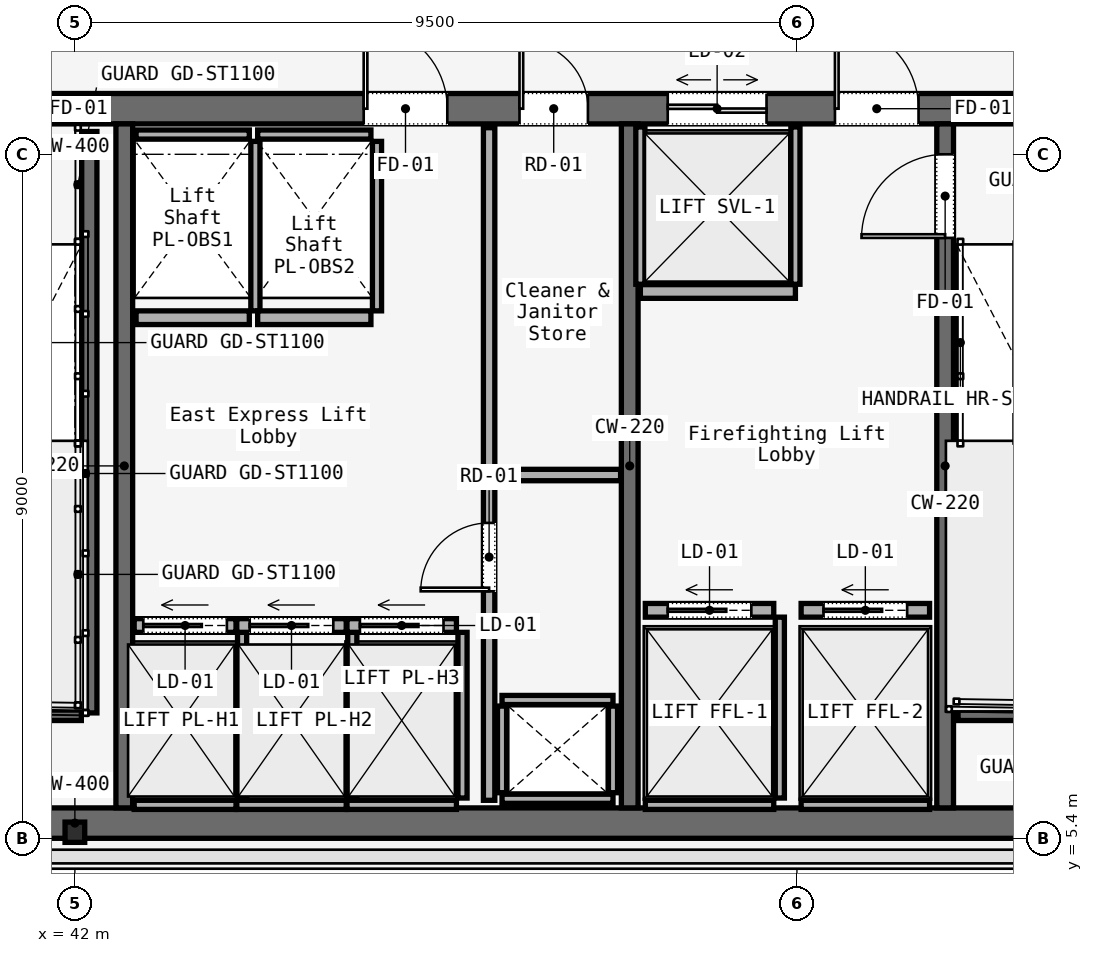
"""IFC4 building model, lengths in metres.
Left out: names, types, materials, properties, quantities, classifications, styles, units other than length and angle.
Written with IfcOpenShell. Run it as: python <this file> out.ifc"""

import sys

from ifc_helpers import new_model, si_unit, direction, frame, frame_2d, origin, origin_2d, place, context, subcontext, project, spatial, rectangle, i_section, extrude, element, fill, save


model = new_model("IFC4")
c1 = context("Model", 3, precision=1e-05, world=origin(), true_north=direction((0.0, 1.0)))
c2 = subcontext(c1, "Body", "Model", "MODEL_VIEW")
j1 = project(units=[si_unit("LENGTHUNIT", "METRE"), si_unit("PLANEANGLEUNIT", "RADIAN")], contexts=[c1])
p1 = place(None, origin())
s1 = spatial("IfcSite", under=j1, at=p1, CompositionType="ELEMENT")
p2 = place(p1, origin())
s2 = spatial("IfcBuilding", under=s1, at=p2, CompositionType="ELEMENT")
p3 = place(p2, frame((0.0, 0.0, 287.1)))
s3 = spatial("IfcBuildingStorey", under=s2, at=p3, CompositionType="ELEMENT", Elevation=287.1)
p4 = place(p3, frame((26.45, 15.0, 0.0), z_axis=(0.0, 0.0, 1.0), x_axis=(1.0, 0.0, 0.0)))
e1 = element("IfcWall", 1, at=p4, inside=s3, PredefinedType="SOLIDWALL", context=c2, shape_type="SweptSolid", body=[
    extrude(rectangle(XDim=31.1, YDim=0.4, at=frame_2d((15.55, 0.0))), origin(), (0.0, 0.0, 1.0), 3.58),
])
p5 = place(p4, frame((1.65, 0.0, 0.0)))
e2 = element("IfcOpeningElement", 2, at=p5, cuts=e1, PredefinedType="OPENING", context=c2, shape_type="SweptSolid", body=[
    extrude(rectangle(XDim=1.1, YDim=2.2, at=frame_2d((0.55, 1.1))), frame((0.0, 0.2, 0.0), z_axis=(0.0, -1.0, 0.0), x_axis=(1.0, 0.0, 0.0)), (0.0, 0.0, 1.0), 0.4),
])
p6 = place(p4, frame((13.65, 0.0, 0.0)))
e3 = element("IfcOpeningElement", 3, at=p6, cuts=e1, PredefinedType="OPENING", context=c2, shape_type="SweptSolid", body=[
    extrude(rectangle(XDim=1.1, YDim=2.2, at=frame_2d((0.55, 1.1))), frame((0.0, 0.2, 0.0), z_axis=(0.0, -1.0, 0.0), x_axis=(1.0, 0.0, 0.0)), (0.0, 0.0, 1.0), 0.4),
])
p7 = place(p4, frame((25.55, 0.0, 0.0)))
e4 = element("IfcOpeningElement", 4, at=p7, cuts=e1, PredefinedType="OPENING", context=c2, shape_type="SweptSolid", body=[
    extrude(rectangle(XDim=1.1, YDim=2.2, at=frame_2d((0.55, 1.1))), frame((0.0, 0.2, 0.0), z_axis=(0.0, -1.0, 0.0), x_axis=(1.0, 0.0, 0.0)), (0.0, 0.0, 1.0), 0.4),
])
p8 = place(p4, frame((19.35, 0.0, 0.0)))
e5 = element("IfcOpeningElement", 5, at=p8, cuts=e1, PredefinedType="OPENING", context=c2, shape_type="SweptSolid", body=[
    extrude(rectangle(XDim=1.1, YDim=2.2, at=frame_2d((0.55, 1.1))), frame((0.0, 0.2, 0.0), z_axis=(0.0, -1.0, 0.0), x_axis=(1.0, 0.0, 0.0)), (0.0, 0.0, 1.0), 0.4),
])
p9 = place(p4, frame((21.4, 0.0, 0.0)))
e6 = element("IfcOpeningElement", 6, at=p9, cuts=e1, PredefinedType="OPENING", context=c2, shape_type="SweptSolid", body=[
    extrude(rectangle(XDim=0.9, YDim=2.1, at=frame_2d((0.45, 1.05))), frame((0.0, 0.2, 0.0), z_axis=(0.0, -1.0, 0.0), x_axis=(1.0, 0.0, 0.0)), (0.0, 0.0, 1.0), 0.4),
])
p10 = place(p4, frame((6.04, 0.0, 0.0)))
e7 = element("IfcOpeningElement", 7, at=p10, cuts=e1, PredefinedType="OPENING", context=c2, shape_type="SweptSolid", body=[
    extrude(rectangle(XDim=0.95, YDim=2.2, at=frame_2d((0.475, 1.1))), frame((0.0, 0.2, 0.0), z_axis=(0.0, -1.0, 0.0), x_axis=(1.0, 0.0, 0.0)), (0.0, 0.0, 1.0), 0.4),
])
p11 = place(p4, frame((9.99, 0.0, 0.0)))
e8 = element("IfcOpeningElement", 8, at=p11, cuts=e1, PredefinedType="OPENING", context=c2, shape_type="SweptSolid", body=[
    extrude(rectangle(XDim=0.95, YDim=2.2, at=frame_2d((0.475, 1.1))), frame((0.0, 0.2, 0.0), z_axis=(0.0, -1.0, 0.0), x_axis=(1.0, 0.0, 0.0)), (0.0, 0.0, 1.0), 0.4),
])
p12 = place(p4, frame((23.35, 0.0, 0.0)))
e9 = element("IfcOpeningElement", 9, at=p12, cuts=e1, PredefinedType="OPENING", context=c2, shape_type="SweptSolid", body=[
    extrude(rectangle(XDim=1.3, YDim=2.3, at=frame_2d((0.65, 1.15))), frame((0.0, 0.2, 0.0), z_axis=(0.0, -1.0, 0.0), x_axis=(1.0, 0.0, 0.0)), (0.0, 0.0, 1.0), 0.4),
])
p13 = place(p3, frame((26.45, 5.6, 0.0), z_axis=(0.0, 0.0, 1.0), x_axis=(1.0, 0.0, 0.0)))
e10 = element("IfcWall", 10, at=p13, inside=s3, PredefinedType="SOLIDWALL", context=c2, shape_type="SweptSolid", body=[
    extrude(rectangle(XDim=31.1, YDim=0.4, at=frame_2d((15.55, 0.0))), origin(), (0.0, 0.0, 1.0), 3.58),
])
for number, where, z_axis, x_axis in (
    (11, (42.65, 5.8, 0.0), (0.0, 0.0, 1.0), (0.0, 1.0, 0.0)),
    (12, (49.3, 5.8, 0.0), (0.0, 0.0, 1.0), (0.0, 1.0, 0.0)),
):
    element("IfcWall", number, at=place(p3, frame(where, z_axis=z_axis, x_axis=x_axis)), inside=s3, PredefinedType="SOLIDWALL", context=c2, shape_type="SweptSolid", body=[
        extrude(rectangle(XDim=9.0, YDim=0.22, at=frame_2d((4.5, 0.0))), origin(), (0.0, 0.0, 1.0), 3.58),
    ])
p14 = place(p3, frame((53.45, 5.8, 0.0), z_axis=(0.0, 0.0, 1.0), x_axis=(0.0, 1.0, 0.0)))
e13 = element("IfcWall", 13, at=p14, inside=s3, PredefinedType="SOLIDWALL", context=c2, shape_type="SweptSolid", body=[
    extrude(rectangle(XDim=9.0, YDim=0.22, at=frame_2d((4.5, 0.0))), origin(), (0.0, 0.0, 1.0), 3.58),
])
p15 = place(p14, frame((7.5, 0.0, 0.0)))
e14 = element("IfcOpeningElement", 14, at=p15, cuts=e13, PredefinedType="OPENING", context=c2, shape_type="SweptSolid", body=[
    extrude(rectangle(XDim=1.1, YDim=2.2, at=frame_2d((0.55, 1.1))), frame((0.0, 0.11, 0.0), z_axis=(0.0, -1.0, 0.0), x_axis=(1.0, 0.0, 0.0)), (0.0, 0.0, 1.0), 0.22),
])
p16 = place(p3, frame((42.0, 5.48, 0.0), z_axis=(0.0, 0.0, 1.0), x_axis=(1.0, 0.0, 0.0)))
e15 = element("IfcColumn", 15, at=p16, inside=s3, PredefinedType="COLUMN", context=c2, shape_type="SweptSolid", body=[
    extrude(i_section(OverallWidth=0.259, OverallDepth=0.267, WebThickness=0.013, FlangeThickness=0.021, FilletRadius=0.013, at=origin_2d()), origin(), (0.0, 0.0, 1.0), 3.58),
])
p17 = place(p3, frame((42.19, 14.7, 0.0), z_axis=(0.0, 0.0, 1.0), x_axis=(0.0, -1.0, 0.0)))
e16 = element("IfcWall", 16, at=p17, inside=s3, PredefinedType="SOLIDWALL", context=c2, shape_type="SweptSolid", body=[
    extrude(rectangle(XDim=7.65, YDim=0.2, at=frame_2d((3.825, 0.0))), origin(), (0.0, 0.0, 1.0), 3.8),
])
for number, where, z_axis, x_axis in (
    (17, (38.97, 7.05, 0.0), (0.0, 0.0, 1.0), (1.0, 0.0, 0.0)),
    (18, (53.62, 7.05, 0.0), (0.0, 0.0, 1.0), (1.0, 0.0, 0.0)),
):
    element("IfcWall", number, at=place(p3, frame(where, z_axis=z_axis, x_axis=x_axis)), inside=s3, PredefinedType="SOLIDWALL", context=c2, shape_type="SweptSolid", body=[
        extrude(rectangle(XDim=3.115, YDim=0.2, at=frame_2d((1.558, 0.0))), origin(), (0.0, 0.0, 1.0), 3.8),
    ])
for number, where, z_axis, x_axis in (
    (19, (47.62, 5.92, 0.0), (0.0, 0.0, 1.0), (1.0, 0.0, 0.0)),
    (20, (47.62, 7.22, 0.0), (0.0, 0.0, 1.0), (1.0, 0.0, 0.0)),
):
    element("IfcWall", number, at=place(p3, frame(where, z_axis=z_axis, x_axis=x_axis)), inside=s3, PredefinedType="SOLIDWALL", context=c2, shape_type="SweptSolid", body=[
        extrude(rectangle(XDim=1.46, YDim=0.12, at=frame_2d((0.73, 0.0))), origin(), (0.0, 0.0, 1.0), 3.01),
    ])
for number, where, z_axis, x_axis in (
    (21, (47.62, 6.0, 0.0), (0.0, 0.0, 1.0), (0.0, 1.0, 0.0)),
    (22, (49.08, 6.0, 0.0), (0.0, 0.0, 1.0), (0.0, 1.0, 0.0)),
):
    element("IfcWall", number, at=place(p3, frame(where, z_axis=z_axis, x_axis=x_axis)), inside=s3, PredefinedType="SOLIDWALL", context=c2, shape_type="SweptSolid", body=[
        extrude(rectangle(XDim=1.14, YDim=0.12, at=frame_2d((0.57, 0.0))), origin(), (0.0, 0.0, 1.0), 3.01),
    ])
p18 = place(p3, frame((47.45, 5.9, 0.0), z_axis=(0.0, 0.0, 1.0), x_axis=(0.0, 1.0, 0.0)))
e23 = element("IfcWall", 23, at=p18, inside=s3, PredefinedType="PARTITIONING", context=c2, shape_type="SweptSolid", body=[
    extrude(rectangle(XDim=8.85, YDim=0.15, at=frame_2d((4.425, 0.0))), origin(), (0.0, 0.0, 1.0), 3.01),
])
p19 = place(p18, frame((2.75, 0.0, 0.0)))
e24 = element("IfcOpeningElement", 24, at=p19, cuts=e23, PredefinedType="OPENING", context=c2, shape_type="SweptSolid", body=[
    extrude(rectangle(XDim=0.9, YDim=2.1, at=frame_2d((0.45, 1.05))), frame((0.0, 0.075, 0.0), z_axis=(0.0, -1.0, 0.0), x_axis=(1.0, 0.0, 0.0)), (0.0, 0.0, 1.0), 0.15),
])
p20 = place(p3, frame((47.45, 10.18, 0.0), z_axis=(0.0, 0.0, 1.0), x_axis=(1.0, 0.0, 0.0)))
e25 = element("IfcWall", 25, at=p20, inside=s3, PredefinedType="PARTITIONING", context=c2, shape_type="SweptSolid", body=[
    extrude(rectangle(XDim=1.73, YDim=0.15, at=frame_2d((0.865, 0.0))), origin(), (0.0, 0.0, 1.0), 3.01),
])
p21 = place(p3, frame((42.78, 8.2, 0.0), z_axis=(0.0, 0.0, 1.0), x_axis=(1.0, 0.0, 0.0)))
e26 = element("IfcWall", 26, at=p21, inside=s3, PredefinedType="SOLIDWALL", context=c2, shape_type="SweptSolid", body=[
    extrude(rectangle(XDim=1.34, YDim=0.18, at=frame_2d((0.67, 0.0))), origin(), (0.0, 0.0, 1.0), 3.01),
])
p22 = place(p21, frame((0.12, 0.0, 0.0)))
e27 = element("IfcOpeningElement", 27, at=p22, cuts=e26, PredefinedType="OPENING", context=c2, shape_type="SweptSolid", body=[
    extrude(rectangle(XDim=1.1, YDim=2.2, at=frame_2d((0.55, 1.1))), frame((0.0, 0.09, 0.0), z_axis=(0.0, -1.0, 0.0), x_axis=(1.0, 0.0, 0.0)), (0.0, 0.0, 1.0), 0.18),
])
p23 = place(p3, frame((42.78, 5.84, 0.0), z_axis=(0.0, 0.0, 1.0), x_axis=(1.0, 0.0, 0.0)))
e28 = element("IfcWall", 28, at=p23, inside=s3, PredefinedType="SOLIDWALL", context=c2, shape_type="SweptSolid", body=[
    extrude(rectangle(XDim=1.34, YDim=0.12, at=frame_2d((0.67, 0.0))), origin(), (0.0, 0.0, 1.0), 3.01),
])
p24 = place(p3, frame((44.2, 5.93, 0.0), z_axis=(0.0, 0.0, 1.0), x_axis=(0.0, 1.0, 0.0)))
e29 = element("IfcWall", 29, at=p24, inside=s3, PredefinedType="SOLIDWALL", context=c2, shape_type="SweptSolid", body=[
    extrude(rectangle(XDim=2.18, YDim=0.12, at=frame_2d((1.09, 0.0))), origin(), (0.0, 0.0, 1.0), 3.01),
])
p25 = place(p3, frame((44.13, 8.2, 0.0), z_axis=(0.0, 0.0, 1.0), x_axis=(1.0, 0.0, 0.0)))
e30 = element("IfcWall", 30, at=p25, inside=s3, PredefinedType="SOLIDWALL", context=c2, shape_type="SweptSolid", body=[
    extrude(rectangle(XDim=1.44, YDim=0.18, at=frame_2d((0.72, 0.0))), origin(), (0.0, 0.0, 1.0), 3.01),
])
p26 = place(p25, frame((0.17, 0.0, 0.0)))
e31 = element("IfcOpeningElement", 31, at=p26, cuts=e30, PredefinedType="OPENING", context=c2, shape_type="SweptSolid", body=[
    extrude(rectangle(XDim=1.1, YDim=2.2, at=frame_2d((0.55, 1.1))), frame((0.0, 0.09, 0.0), z_axis=(0.0, -1.0, 0.0), x_axis=(1.0, 0.0, 0.0)), (0.0, 0.0, 1.0), 0.18),
])
p27 = place(p3, frame((44.13, 5.84, 0.0), z_axis=(0.0, 0.0, 1.0), x_axis=(1.0, 0.0, 0.0)))
e32 = element("IfcWall", 32, at=p27, inside=s3, PredefinedType="SOLIDWALL", context=c2, shape_type="SweptSolid", body=[
    extrude(rectangle(XDim=1.44, YDim=0.12, at=frame_2d((0.72, 0.0))), origin(), (0.0, 0.0, 1.0), 3.01),
])
p28 = place(p3, frame((45.65, 5.93, 0.0), z_axis=(0.0, 0.0, 1.0), x_axis=(0.0, 1.0, 0.0)))
e33 = element("IfcWall", 33, at=p28, inside=s3, PredefinedType="SOLIDWALL", context=c2, shape_type="SweptSolid", body=[
    extrude(rectangle(XDim=2.18, YDim=0.12, at=frame_2d((1.09, 0.0))), origin(), (0.0, 0.0, 1.0), 3.01),
])
p29 = place(p3, frame((45.58, 8.2, 0.0), z_axis=(0.0, 0.0, 1.0), x_axis=(1.0, 0.0, 0.0)))
e34 = element("IfcWall", 34, at=p29, inside=s3, PredefinedType="SOLIDWALL", context=c2, shape_type="SweptSolid", body=[
    extrude(rectangle(XDim=1.44, YDim=0.18, at=frame_2d((0.72, 0.0))), origin(), (0.0, 0.0, 1.0), 3.01),
])
p30 = place(p29, frame((0.17, 0.0, 0.0)))
e35 = element("IfcOpeningElement", 35, at=p30, cuts=e34, PredefinedType="OPENING", context=c2, shape_type="SweptSolid", body=[
    extrude(rectangle(XDim=1.1, YDim=2.2, at=frame_2d((0.55, 1.1))), frame((0.0, 0.09, 0.0), z_axis=(0.0, -1.0, 0.0), x_axis=(1.0, 0.0, 0.0)), (0.0, 0.0, 1.0), 0.18),
])
p31 = place(p3, frame((45.58, 5.84, 0.0), z_axis=(0.0, 0.0, 1.0), x_axis=(1.0, 0.0, 0.0)))
e36 = element("IfcWall", 36, at=p31, inside=s3, PredefinedType="SOLIDWALL", context=c2, shape_type="SweptSolid", body=[
    extrude(rectangle(XDim=1.44, YDim=0.12, at=frame_2d((0.72, 0.0))), origin(), (0.0, 0.0, 1.0), 3.01),
])
p32 = place(p3, frame((47.1, 5.93, 0.0), z_axis=(0.0, 0.0, 1.0), x_axis=(0.0, 1.0, 0.0)))
e37 = element("IfcWall", 37, at=p32, inside=s3, PredefinedType="SOLIDWALL", context=c2, shape_type="SweptSolid", body=[
    extrude(rectangle(XDim=2.18, YDim=0.12, at=frame_2d((1.09, 0.0))), origin(), (0.0, 0.0, 1.0), 3.01),
])
p33 = place(p3, frame((42.805, 12.25, 0.0), z_axis=(0.0, 0.0, 1.0), x_axis=(1.0, 0.0, 0.0)))
e38 = element("IfcWall", 38, at=p33, inside=s3, PredefinedType="SOLIDWALL", context=c2, shape_type="SweptSolid", body=[
    extrude(rectangle(XDim=1.49, YDim=0.18, at=frame_2d((0.745, 0.0))), origin(), (0.0, 0.0, 1.0), 3.01),
])
p34 = place(p3, frame((42.805, 14.66, 0.0), z_axis=(0.0, 0.0, 1.0), x_axis=(1.0, 0.0, 0.0)))
e39 = element("IfcWall", 39, at=p34, inside=s3, PredefinedType="SOLIDWALL", context=c2, shape_type="SweptSolid", body=[
    extrude(rectangle(XDim=1.49, YDim=0.12, at=frame_2d((0.745, 0.0))), origin(), (0.0, 0.0, 1.0), 3.01),
])
p35 = place(p3, frame((44.375, 12.34, 0.0), z_axis=(0.0, 0.0, 1.0), x_axis=(0.0, 1.0, 0.0)))
e40 = element("IfcWall", 40, at=p35, inside=s3, PredefinedType="SOLIDWALL", context=c2, shape_type="SweptSolid", body=[
    extrude(rectangle(XDim=2.23, YDim=0.12, at=frame_2d((1.115, 0.0))), origin(), (0.0, 0.0, 1.0), 3.01),
])
p36 = place(p3, frame((44.405, 12.25, 0.0), z_axis=(0.0, 0.0, 1.0), x_axis=(1.0, 0.0, 0.0)))
e41 = element("IfcWall", 41, at=p36, inside=s3, PredefinedType="SOLIDWALL", context=c2, shape_type="SweptSolid", body=[
    extrude(rectangle(XDim=1.49, YDim=0.18, at=frame_2d((0.745, 0.0))), origin(), (0.0, 0.0, 1.0), 3.01),
])
p37 = place(p3, frame((44.405, 14.66, 0.0), z_axis=(0.0, 0.0, 1.0), x_axis=(1.0, 0.0, 0.0)))
e42 = element("IfcWall", 42, at=p37, inside=s3, PredefinedType="SOLIDWALL", context=c2, shape_type="SweptSolid", body=[
    extrude(rectangle(XDim=1.49, YDim=0.12, at=frame_2d((0.745, 0.0))), origin(), (0.0, 0.0, 1.0), 3.01),
])
p38 = place(p3, frame((45.975, 12.34, 0.0), z_axis=(0.0, 0.0, 1.0), x_axis=(0.0, 1.0, 0.0)))
e43 = element("IfcWall", 43, at=p38, inside=s3, PredefinedType="SOLIDWALL", context=c2, shape_type="SweptSolid", body=[
    extrude(rectangle(XDim=2.23, YDim=0.12, at=frame_2d((1.115, 0.0))), origin(), (0.0, 0.0, 1.0), 3.01),
])
p39 = place(p3, frame((49.505, 8.4, 0.0), z_axis=(0.0, 0.0, 1.0), x_axis=(1.0, 0.0, 0.0)))
e44 = element("IfcWall", 44, at=p39, inside=s3, PredefinedType="SOLIDWALL", context=c2, shape_type="SweptSolid", body=[
    extrude(rectangle(XDim=1.69, YDim=0.18, at=frame_2d((0.845, 0.0))), origin(), (0.0, 0.0, 1.0), 3.01),
])
p40 = place(p39, frame((0.295, 0.0, 0.0)))
e45 = element("IfcOpeningElement", 45, at=p40, cuts=e44, PredefinedType="OPENING", context=c2, shape_type="SweptSolid", body=[
    extrude(rectangle(XDim=1.1, YDim=2.2, at=frame_2d((0.55, 1.1))), frame((0.0, 0.09, 0.0), z_axis=(0.0, -1.0, 0.0), x_axis=(1.0, 0.0, 0.0)), (0.0, 0.0, 1.0), 0.18),
])
p41 = place(p3, frame((49.505, 5.84, 0.0), z_axis=(0.0, 0.0, 1.0), x_axis=(1.0, 0.0, 0.0)))
e46 = element("IfcWall", 46, at=p41, inside=s3, PredefinedType="SOLIDWALL", context=c2, shape_type="SweptSolid", body=[
    extrude(rectangle(XDim=1.69, YDim=0.12, at=frame_2d((0.845, 0.0))), origin(), (0.0, 0.0, 1.0), 3.01),
])
p42 = place(p3, frame((51.275, 5.93, 0.0), z_axis=(0.0, 0.0, 1.0), x_axis=(0.0, 1.0, 0.0)))
e47 = element("IfcWall", 47, at=p42, inside=s3, PredefinedType="SOLIDWALL", context=c2, shape_type="SweptSolid", body=[
    extrude(rectangle(XDim=2.38, YDim=0.12, at=frame_2d((1.19, 0.0))), origin(), (0.0, 0.0, 1.0), 3.01),
])
p43 = place(p3, frame((51.555, 8.4, 0.0), z_axis=(0.0, 0.0, 1.0), x_axis=(1.0, 0.0, 0.0)))
e48 = element("IfcWall", 48, at=p43, inside=s3, PredefinedType="SOLIDWALL", context=c2, shape_type="SweptSolid", body=[
    extrude(rectangle(XDim=1.69, YDim=0.18, at=frame_2d((0.845, 0.0))), origin(), (0.0, 0.0, 1.0), 3.01),
])
p44 = place(p43, frame((0.295, 0.0, 0.0)))
e49 = element("IfcOpeningElement", 49, at=p44, cuts=e48, PredefinedType="OPENING", context=c2, shape_type="SweptSolid", body=[
    extrude(rectangle(XDim=1.1, YDim=2.2, at=frame_2d((0.55, 1.1))), frame((0.0, 0.09, 0.0), z_axis=(0.0, -1.0, 0.0), x_axis=(1.0, 0.0, 0.0)), (0.0, 0.0, 1.0), 0.18),
])
p45 = place(p3, frame((51.555, 5.84, 0.0), z_axis=(0.0, 0.0, 1.0), x_axis=(1.0, 0.0, 0.0)))
e50 = element("IfcWall", 50, at=p45, inside=s3, PredefinedType="SOLIDWALL", context=c2, shape_type="SweptSolid", body=[
    extrude(rectangle(XDim=1.69, YDim=0.12, at=frame_2d((0.845, 0.0))), origin(), (0.0, 0.0, 1.0), 3.01),
])
p46 = place(p3, frame((49.44, 12.595, 0.0), z_axis=(0.0, 0.0, 1.0), x_axis=(1.0, 0.0, 0.0)))
e51 = element("IfcWall", 51, at=p46, inside=s3, PredefinedType="SOLIDWALL", context=c2, shape_type="SweptSolid", body=[
    extrude(rectangle(XDim=2.04, YDim=0.18, at=frame_2d((1.02, 0.0))), origin(), (0.0, 0.0, 1.0), 3.01),
])
for number, where, z_axis, x_axis in (
    (52, (49.44, 12.69, 0.0), (0.0, 0.0, 1.0), (0.0, 1.0, 0.0)),
    (53, (51.48, 12.69, 0.0), (0.0, 0.0, 1.0), (0.0, 1.0, 0.0)),
):
    element("IfcWall", number, at=place(p3, frame(where, z_axis=z_axis, x_axis=x_axis)), inside=s3, PredefinedType="SOLIDWALL", context=c2, shape_type="SweptSolid", body=[
        extrude(rectangle(XDim=2.07, YDim=0.12, at=frame_2d((1.035, 0.0))), origin(), (0.0, 0.0, 1.0), 3.01),
    ])
p47 = place(p7, origin())
e54 = element("IfcDoor", 54, at=p47, inside=s3, OperationType="SINGLE_SWING_RIGHT", PredefinedType="DOOR", context=c2, shape_type="SweptSolid", body=[
    extrude(rectangle(XDim=1.1, YDim=2.2, at=frame_2d((0.55, 1.1))), frame((0.0, 0.025, 0.0), z_axis=(0.0, -1.0, 0.0), x_axis=(1.0, 0.0, 0.0)), (0.0, 0.0, 1.0), 0.05),
])
fill(e4, e54)
p48 = place(p8, origin())
e55 = element("IfcDoor", 55, at=p48, inside=s3, OperationType="SINGLE_SWING_LEFT", PredefinedType="DOOR", context=c2, shape_type="SweptSolid", body=[
    extrude(rectangle(XDim=1.1, YDim=2.2, at=frame_2d((0.55, 1.1))), frame((0.0, 0.025, 0.0), z_axis=(0.0, -1.0, 0.0), x_axis=(1.0, 0.0, 0.0)), (0.0, 0.0, 1.0), 0.05),
])
fill(e5, e55)
p49 = place(p9, origin())
e56 = element("IfcDoor", 56, at=p49, inside=s3, OperationType="SINGLE_SWING_LEFT", PredefinedType="DOOR", context=c2, shape_type="SweptSolid", body=[
    extrude(rectangle(XDim=0.9, YDim=2.1, at=frame_2d((0.45, 1.05))), frame((0.0, 0.025, 0.0), z_axis=(0.0, -1.0, 0.0), x_axis=(1.0, 0.0, 0.0)), (0.0, 0.0, 1.0), 0.05),
])
fill(e6, e56)
p50 = place(p15, origin())
e57 = element("IfcDoor", 57, at=p50, inside=s3, OperationType="SINGLE_SWING_LEFT", PredefinedType="DOOR", context=c2, shape_type="SweptSolid", body=[
    extrude(rectangle(XDim=1.1, YDim=2.2, at=frame_2d((0.55, 1.1))), frame((0.0, 0.025, 0.0), z_axis=(0.0, -1.0, 0.0), x_axis=(1.0, 0.0, 0.0)), (0.0, 0.0, 1.0), 0.05),
])
fill(e14, e57)
p51 = place(p19, origin())
e58 = element("IfcDoor", 58, at=p51, inside=s3, OperationType="SINGLE_SWING_RIGHT", PredefinedType="DOOR", context=c2, shape_type="SweptSolid", body=[
    extrude(rectangle(XDim=0.9, YDim=2.1, at=frame_2d((0.45, 1.05))), frame((0.0, 0.025, 0.0), z_axis=(0.0, -1.0, 0.0), x_axis=(1.0, 0.0, 0.0)), (0.0, 0.0, 1.0), 0.05),
])
fill(e24, e58)
p52 = place(p22, origin())
e59 = element("IfcDoor", 59, at=p52, inside=s3, OperationType="SLIDING_TO_LEFT", PredefinedType="DOOR", context=c2, shape_type="SweptSolid", body=[
    extrude(rectangle(XDim=1.1, YDim=2.2, at=frame_2d((0.55, 1.1))), frame((0.0, 0.025, 0.0), z_axis=(0.0, -1.0, 0.0), x_axis=(1.0, 0.0, 0.0)), (0.0, 0.0, 1.0), 0.05),
])
fill(e27, e59)
p53 = place(p26, origin())
e60 = element("IfcDoor", 60, at=p53, inside=s3, OperationType="SLIDING_TO_LEFT", PredefinedType="DOOR", context=c2, shape_type="SweptSolid", body=[
    extrude(rectangle(XDim=1.1, YDim=2.2, at=frame_2d((0.55, 1.1))), frame((0.0, 0.025, 0.0), z_axis=(0.0, -1.0, 0.0), x_axis=(1.0, 0.0, 0.0)), (0.0, 0.0, 1.0), 0.05),
])
fill(e31, e60)
p54 = place(p30, origin())
e61 = element("IfcDoor", 61, at=p54, inside=s3, OperationType="SLIDING_TO_LEFT", PredefinedType="DOOR", context=c2, shape_type="SweptSolid", body=[
    extrude(rectangle(XDim=1.1, YDim=2.2, at=frame_2d((0.55, 1.1))), frame((0.0, 0.025, 0.0), z_axis=(0.0, -1.0, 0.0), x_axis=(1.0, 0.0, 0.0)), (0.0, 0.0, 1.0), 0.05),
])
fill(e35, e61)
p55 = place(p40, origin())
e62 = element("IfcDoor", 62, at=p55, inside=s3, OperationType="SLIDING_TO_LEFT", PredefinedType="DOOR", context=c2, shape_type="SweptSolid", body=[
    extrude(rectangle(XDim=1.1, YDim=2.2, at=frame_2d((0.55, 1.1))), frame((0.0, 0.025, 0.0), z_axis=(0.0, -1.0, 0.0), x_axis=(1.0, 0.0, 0.0)), (0.0, 0.0, 1.0), 0.05),
])
fill(e45, e62)
p56 = place(p44, origin())
e63 = element("IfcDoor", 63, at=p56, inside=s3, OperationType="SLIDING_TO_LEFT", PredefinedType="DOOR", context=c2, shape_type="SweptSolid", body=[
    extrude(rectangle(XDim=1.1, YDim=2.2, at=frame_2d((0.55, 1.1))), frame((0.0, 0.025, 0.0), z_axis=(0.0, -1.0, 0.0), x_axis=(1.0, 0.0, 0.0)), (0.0, 0.0, 1.0), 0.05),
])
fill(e49, e63)
p57 = place(p12, origin())
e64 = element("IfcDoor", 64, at=p57, inside=s3, OperationType="DOUBLE_DOOR_SLIDING", PredefinedType="DOOR", context=c2, shape_type="SweptSolid", body=[
    extrude(rectangle(XDim=1.3, YDim=2.3, at=frame_2d((0.65, 1.15))), frame((0.0, 0.025, 0.0), z_axis=(0.0, -1.0, 0.0), x_axis=(1.0, 0.0, 0.0)), (0.0, 0.0, 1.0), 0.05),
])
fill(e9, e64)
save(model, sys.argv[1])
